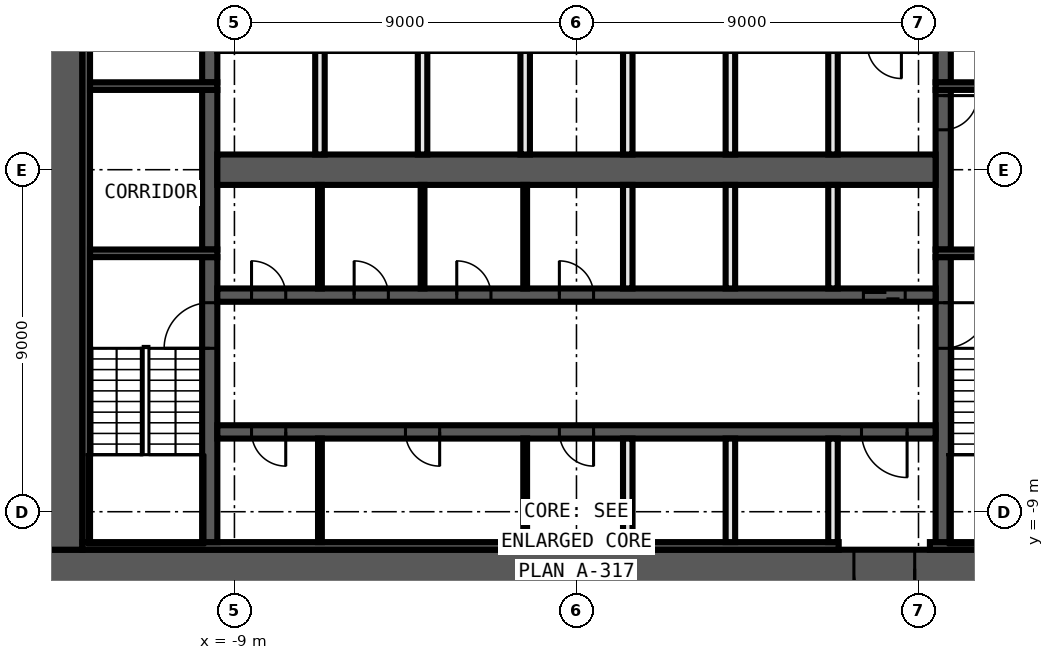
"""IFC4 building model, lengths in metres.
Left out: names, types, materials, properties, quantities, classifications, styles, units other than length and angle.
Written with IfcOpenShell. Run it as: python <this file> out.ifc"""

import sys

from ifc_helpers import new_model, si_unit, direction, frame, frame_2d, origin, place, context, subcontext, project, spatial, rectangle, extrude, element, fill, save


model = new_model("IFC4")
c1 = context("Model", 3, precision=1e-05, world=origin(), true_north=direction((0.0, 1.0)))
c2 = subcontext(c1, "Body", "Model", "MODEL_VIEW")
j1 = project(units=[si_unit("LENGTHUNIT", "METRE"), si_unit("PLANEANGLEUNIT", "RADIAN")], contexts=[c1])
p1 = place(None, origin())
s1 = spatial("IfcSite", under=j1, at=p1, CompositionType="ELEMENT")
p2 = place(p1, origin())
s2 = spatial("IfcBuilding", under=s1, at=p2, CompositionType="ELEMENT")
p3 = place(p2, frame((0.0, 0.0, 128.5)))
s3 = spatial("IfcBuildingStorey", under=s2, at=p3, CompositionType="ELEMENT", Elevation=128.5)
p4 = place(p3, frame((14.0, -10.5, 0.0), z_axis=(0.0, 0.0, 1.0), x_axis=(-1.0, 0.0, 0.0)))
e1 = element("IfcWall", 1, at=p4, inside=s3, PredefinedType="SHEAR", context=c2, shape_type="SweptSolid", body=[
    extrude(rectangle(XDim=28.0, YDim=1.0, at=frame_2d((14.0, 0.0))), origin(), (0.0, 0.0, 1.0), 3.3),
])
p5 = place(p4, frame((5.1, 0.0, 0.0)))
e2 = element("IfcOpeningElement", 2, at=p5, cuts=e1, PredefinedType="OPENING", context=c2, shape_type="SweptSolid", body=[
    extrude(rectangle(XDim=1.6, YDim=2.1, at=frame_2d((0.8, 1.05))), frame((0.0, 0.51, 0.0), z_axis=(0.0, -1.0, 0.0), x_axis=(1.0, 0.0, 0.0)), (0.0, 0.0, 1.0), 1.02),
])
p6 = place(p3, frame((-13.5, -10.0, 0.0), z_axis=(0.0, 0.0, 1.0), x_axis=(0.0, 1.0, 0.0)))
e3 = element("IfcWall", 3, at=p6, inside=s3, PredefinedType="SHEAR", context=c2, shape_type="SweptSolid", body=[
    extrude(rectangle(XDim=20.0, YDim=1.0, at=frame_2d((10.0, 0.0))), origin(), (0.0, 0.0, 1.0), 3.3),
])
p7 = place(p3, frame((13.0, -9.9, 0.0), z_axis=(0.0, 0.0, 1.0), x_axis=(-1.0, 0.0, 0.0)))
e4 = element("IfcWall", 4, at=p7, inside=s3, PredefinedType="SHEAR", context=c2, shape_type="SweptSolid", body=[
    extrude(rectangle(XDim=3.7, YDim=0.2, at=frame_2d((1.85, 0.0))), origin(), (0.0, 0.0, 1.0), 3.3),
])
p8 = place(p3, frame((6.9, -9.9, 0.0), z_axis=(0.0, 0.0, 1.0), x_axis=(-1.0, 0.0, 0.0)))
e5 = element("IfcWall", 5, at=p8, inside=s3, PredefinedType="SHEAR", context=c2, shape_type="SweptSolid", body=[
    extrude(rectangle(XDim=19.9, YDim=0.2, at=frame_2d((9.95, 0.0))), origin(), (0.0, 0.0, 1.0), 3.3),
])
p9 = place(p3, frame((-12.9, -9.8, 0.0), z_axis=(0.0, 0.0, 1.0), x_axis=(0.0, 1.0, 0.0)))
e6 = element("IfcWall", 6, at=p9, inside=s3, PredefinedType="SHEAR", context=c2, shape_type="SweptSolid", body=[
    extrude(rectangle(XDim=19.6, YDim=0.2, at=frame_2d((9.8, 0.0))), origin(), (0.0, 0.0, 1.0), 3.3),
])
p10 = place(p3, frame((9.65, -2.3, 0.0), z_axis=(0.0, 0.0, 1.0), x_axis=(0.0, -1.0, 0.0)))
e7 = element("IfcWall", 7, at=p10, inside=s3, PredefinedType="SHEAR", context=c2, shape_type="SweptSolid", body=[
    extrude(rectangle(XDim=7.5, YDim=0.4, at=frame_2d((3.75, 0.0))), origin(), (0.0, 0.0, 1.0), 3.3),
])
p11 = place(p10, frame((1.2, 0.0, 0.0)))
e8 = element("IfcOpeningElement", 8, at=p11, cuts=e7, PredefinedType="OPENING", context=c2, shape_type="SweptSolid", body=[
    extrude(rectangle(XDim=1.2, YDim=2.1, at=frame_2d((0.6, 1.05))), frame((0.0, 0.21, 0.0), z_axis=(0.0, -1.0, 0.0), x_axis=(1.0, 0.0, 0.0)), (0.0, 0.0, 1.0), 0.42),
])
p12 = place(p3, frame((9.65, 2.1, 0.0), z_axis=(0.0, 0.0, 1.0), x_axis=(0.0, -1.0, 0.0)))
e9 = element("IfcWall", 9, at=p12, inside=s3, PredefinedType="SHEAR", context=c2, shape_type="SweptSolid", body=[
    extrude(rectangle(XDim=4.2, YDim=0.4, at=frame_2d((2.1, 0.0))), origin(), (0.0, 0.0, 1.0), 3.3),
])
p13 = place(p12, frame((0.15, 0.0, 0.0)))
e10 = element("IfcOpeningElement", 10, at=p13, cuts=e9, PredefinedType="OPENING", context=c2, shape_type="SweptSolid", body=[
    extrude(rectangle(XDim=0.9, YDim=2.1, at=frame_2d((0.45, 1.05))), frame((0.0, 0.21, 0.0), z_axis=(0.0, -1.0, 0.0), x_axis=(1.0, 0.0, 0.0)), (0.0, 0.0, 1.0), 0.42),
])
p14 = place(p3, frame((9.65, 9.8, 0.0), z_axis=(0.0, 0.0, 1.0), x_axis=(0.0, -1.0, 0.0)))
e11 = element("IfcWall", 11, at=p14, inside=s3, PredefinedType="SHEAR", context=c2, shape_type="SweptSolid", body=[
    extrude(rectangle(XDim=7.5, YDim=0.4, at=frame_2d((3.75, 0.0))), origin(), (0.0, 0.0, 1.0), 3.3),
])
p15 = place(p14, frame((5.1, 0.0, 0.0)))
e12 = element("IfcOpeningElement", 12, at=p15, cuts=e11, PredefinedType="OPENING", context=c2, shape_type="SweptSolid", body=[
    extrude(rectangle(XDim=1.2, YDim=2.1, at=frame_2d((0.6, 1.05))), frame((0.0, 0.21, 0.0), z_axis=(0.0, -1.0, 0.0), x_axis=(1.0, 0.0, 0.0)), (0.0, 0.0, 1.0), 0.42),
])
p16 = place(p3, frame((-9.65, -9.8, 0.0), z_axis=(0.0, 0.0, 1.0), x_axis=(0.0, 1.0, 0.0)))
e13 = element("IfcWall", 13, at=p16, inside=s3, PredefinedType="SHEAR", context=c2, shape_type="SweptSolid", body=[
    extrude(rectangle(XDim=7.5, YDim=0.4, at=frame_2d((3.75, 0.0))), origin(), (0.0, 0.0, 1.0), 3.3),
])
p17 = place(p16, frame((5.1, 0.0, 0.0)))
e14 = element("IfcOpeningElement", 14, at=p17, cuts=e13, PredefinedType="OPENING", context=c2, shape_type="SweptSolid", body=[
    extrude(rectangle(XDim=1.2, YDim=2.1, at=frame_2d((0.6, 1.05))), frame((0.0, 0.21, 0.0), z_axis=(0.0, -1.0, 0.0), x_axis=(1.0, 0.0, 0.0)), (0.0, 0.0, 1.0), 0.42),
])
p18 = place(p3, frame((-9.65, -2.1, 0.0), z_axis=(0.0, 0.0, 1.0), x_axis=(0.0, 1.0, 0.0)))
e15 = element("IfcWall", 15, at=p18, inside=s3, PredefinedType="SHEAR", context=c2, shape_type="SweptSolid", body=[
    extrude(rectangle(XDim=4.2, YDim=0.4, at=frame_2d((2.1, 0.0))), origin(), (0.0, 0.0, 1.0), 3.3),
])
p19 = place(p3, frame((-9.65, 2.3, 0.0), z_axis=(0.0, 0.0, 1.0), x_axis=(0.0, 1.0, 0.0)))
e16 = element("IfcWall", 16, at=p19, inside=s3, PredefinedType="SHEAR", context=c2, shape_type="SweptSolid", body=[
    extrude(rectangle(XDim=7.5, YDim=0.4, at=frame_2d((3.75, 0.0))), origin(), (0.0, 0.0, 1.0), 3.3),
])
p20 = place(p19, frame((1.2, 0.0, 0.0)))
e17 = element("IfcOpeningElement", 17, at=p20, cuts=e16, PredefinedType="OPENING", context=c2, shape_type="SweptSolid", body=[
    extrude(rectangle(XDim=1.2, YDim=2.1, at=frame_2d((0.6, 1.05))), frame((0.0, 0.21, 0.0), z_axis=(0.0, -1.0, 0.0), x_axis=(1.0, 0.0, 0.0)), (0.0, 0.0, 1.0), 0.42),
])
for number, where, z_axis, x_axis in (
    (18, (9.45, 2.2, 0.0), (0.0, 0.0, 1.0), (1.0, 0.0, 0.0)),
    (19, (-9.45, 2.2, 0.0), (0.0, 0.0, 1.0), (-1.0, 0.0, 0.0)),
    (20, (9.45, -2.2, 0.0), (0.0, 0.0, 1.0), (1.0, 0.0, 0.0)),
    (21, (-9.45, -2.2, 0.0), (0.0, 0.0, 1.0), (-1.0, 0.0, 0.0)),
):
    element("IfcWall", number, at=place(p3, frame(where, z_axis=z_axis, x_axis=x_axis)), inside=s3, PredefinedType="SHEAR", context=c2, shape_type="SweptSolid", body=[
        extrude(rectangle(XDim=3.35, YDim=0.2, at=frame_2d((1.675, 0.0))), origin(), (0.0, 0.0, 1.0), 3.3),
    ])
p21 = place(p3, frame((-9.45, -3.3, 0.0), z_axis=(0.0, 0.0, 1.0), x_axis=(1.0, 0.0, 0.0)))
e22 = element("IfcWall", 22, at=p21, inside=s3, PredefinedType="SHEAR", context=c2, shape_type="SweptSolid", body=[
    extrude(rectangle(XDim=18.9, YDim=0.35, at=frame_2d((9.45, 0.0))), origin(), (0.0, 0.0, 1.0), 3.3),
])
p22 = place(p21, frame((17.0, 0.0, 0.0)))
e23 = element("IfcOpeningElement", 23, at=p22, cuts=e22, PredefinedType="OPENING", context=c2, shape_type="SweptSolid", body=[
    extrude(rectangle(XDim=1.1, YDim=2.1, at=frame_2d((0.55, 1.05))), frame((0.0, 0.185, 0.0), z_axis=(0.0, -1.0, 0.0), x_axis=(1.0, 0.0, 0.0)), (0.0, 0.0, 1.0), 0.37),
])
p23 = place(p21, frame((0.9, 0.0, 0.0)))
e24 = element("IfcOpeningElement", 24, at=p23, cuts=e22, PredefinedType="OPENING", context=c2, shape_type="SweptSolid", body=[
    extrude(rectangle(XDim=0.9, YDim=2.1, at=frame_2d((0.45, 1.05))), frame((0.0, 0.185, 0.0), z_axis=(0.0, -1.0, 0.0), x_axis=(1.0, 0.0, 0.0)), (0.0, 0.0, 1.0), 0.37),
])
p24 = place(p21, frame((3.6, 0.0, 0.0)))
e25 = element("IfcOpeningElement", 25, at=p24, cuts=e22, PredefinedType="OPENING", context=c2, shape_type="SweptSolid", body=[
    extrude(rectangle(XDim=0.9, YDim=2.1, at=frame_2d((0.45, 1.05))), frame((0.0, 0.185, 0.0), z_axis=(0.0, -1.0, 0.0), x_axis=(1.0, 0.0, 0.0)), (0.0, 0.0, 1.0), 0.37),
])
p25 = place(p21, frame((6.3, 0.0, 0.0)))
e26 = element("IfcOpeningElement", 26, at=p25, cuts=e22, PredefinedType="OPENING", context=c2, shape_type="SweptSolid", body=[
    extrude(rectangle(XDim=0.9, YDim=2.1, at=frame_2d((0.45, 1.05))), frame((0.0, 0.185, 0.0), z_axis=(0.0, -1.0, 0.0), x_axis=(1.0, 0.0, 0.0)), (0.0, 0.0, 1.0), 0.37),
])
p26 = place(p21, frame((9.0, 0.0, 0.0)))
e27 = element("IfcOpeningElement", 27, at=p26, cuts=e22, PredefinedType="OPENING", context=c2, shape_type="SweptSolid", body=[
    extrude(rectangle(XDim=0.9, YDim=2.1, at=frame_2d((0.45, 1.05))), frame((0.0, 0.185, 0.0), z_axis=(0.0, -1.0, 0.0), x_axis=(1.0, 0.0, 0.0)), (0.0, 0.0, 1.0), 0.37),
])
p27 = place(p3, frame((9.45, -6.9, 0.0), z_axis=(0.0, 0.0, 1.0), x_axis=(-1.0, 0.0, 0.0)))
e28 = element("IfcWall", 28, at=p27, inside=s3, PredefinedType="SHEAR", context=c2, shape_type="SweptSolid", body=[
    extrude(rectangle(XDim=18.9, YDim=0.35, at=frame_2d((9.45, 0.0))), origin(), (0.0, 0.0, 1.0), 3.3),
])
p28 = place(p27, frame((0.75, 0.0, 0.0)))
e29 = element("IfcOpeningElement", 29, at=p28, cuts=e28, PredefinedType="OPENING", context=c2, shape_type="SweptSolid", body=[
    extrude(rectangle(XDim=1.2, YDim=2.1, at=frame_2d((0.6, 1.05))), frame((0.0, 0.185, 0.0), z_axis=(0.0, -1.0, 0.0), x_axis=(1.0, 0.0, 0.0)), (0.0, 0.0, 1.0), 0.37),
])
p29 = place(p27, frame((17.1, 0.0, 0.0)))
e30 = element("IfcOpeningElement", 30, at=p29, cuts=e28, PredefinedType="OPENING", context=c2, shape_type="SweptSolid", body=[
    extrude(rectangle(XDim=0.9, YDim=2.1, at=frame_2d((0.45, 1.05))), frame((0.0, 0.185, 0.0), z_axis=(0.0, -1.0, 0.0), x_axis=(1.0, 0.0, 0.0)), (0.0, 0.0, 1.0), 0.37),
])
p30 = place(p27, frame((13.05, 0.0, 0.0)))
e31 = element("IfcOpeningElement", 31, at=p30, cuts=e28, PredefinedType="OPENING", context=c2, shape_type="SweptSolid", body=[
    extrude(rectangle(XDim=0.9, YDim=2.1, at=frame_2d((0.45, 1.05))), frame((0.0, 0.185, 0.0), z_axis=(0.0, -1.0, 0.0), x_axis=(1.0, 0.0, 0.0)), (0.0, 0.0, 1.0), 0.37),
])
p31 = place(p27, frame((9.0, 0.0, 0.0)))
e32 = element("IfcOpeningElement", 32, at=p31, cuts=e28, PredefinedType="OPENING", context=c2, shape_type="SweptSolid", body=[
    extrude(rectangle(XDim=0.9, YDim=2.1, at=frame_2d((0.45, 1.05))), frame((0.0, 0.185, 0.0), z_axis=(0.0, -1.0, 0.0), x_axis=(1.0, 0.0, 0.0)), (0.0, 0.0, 1.0), 0.37),
])
p32 = place(p3, frame((-9.45, 0.0, 0.0), z_axis=(0.0, 0.0, 1.0), x_axis=(1.0, 0.0, 0.0)))
e33 = element("IfcWall", 33, at=p32, inside=s3, PredefinedType="SHEAR", context=c2, shape_type="SweptSolid", body=[
    extrude(rectangle(XDim=18.9, YDim=0.8, at=frame_2d((9.45, 0.0))), origin(), (0.0, 0.0, 1.0), 3.3),
])
for number, where, z_axis, x_axis in (
    (34, (6.75, -9.8, 0.0), (0.0, 0.0, 1.0), (0.0, 1.0, 0.0)),
    (35, (6.75, -3.125, 0.0), (0.0, 0.0, 1.0), (0.0, 1.0, 0.0)),
    (36, (6.75, 0.4, 0.0), (0.0, 0.0, 1.0), (0.0, 1.0, 0.0)),
    (37, (4.05, -9.8, 0.0), (0.0, 0.0, 1.0), (0.0, 1.0, 0.0)),
    (38, (4.05, -3.125, 0.0), (0.0, 0.0, 1.0), (0.0, 1.0, 0.0)),
    (39, (4.05, 0.4, 0.0), (0.0, 0.0, 1.0), (0.0, 1.0, 0.0)),
    (40, (1.35, -9.8, 0.0), (0.0, 0.0, 1.0), (0.0, 1.0, 0.0)),
    (41, (1.35, -3.125, 0.0), (0.0, 0.0, 1.0), (0.0, 1.0, 0.0)),
    (42, (1.35, 0.4, 0.0), (0.0, 0.0, 1.0), (0.0, 1.0, 0.0)),
):
    element("IfcWall", number, at=place(p3, frame(where, z_axis=z_axis, x_axis=x_axis)), inside=s3, PredefinedType="SOLIDWALL", context=c2, shape_type="SweptSolid", body=[
        extrude(rectangle(XDim=2.725, YDim=0.25, at=frame_2d((1.363, 0.0))), origin(), (0.0, 0.0, 1.0), 3.3),
    ])
for number, where, z_axis, x_axis in (
    (43, (-1.35, -9.8, 0.0), (0.0, 0.0, 1.0), (0.0, 1.0, 0.0)),
    (44, (-1.35, -3.125, 0.0), (0.0, 0.0, 1.0), (0.0, 1.0, 0.0)),
):
    element("IfcWall", number, at=place(p3, frame(where, z_axis=z_axis, x_axis=x_axis)), inside=s3, PredefinedType="PARTITIONING", context=c2, shape_type="SweptSolid", body=[
        extrude(rectangle(XDim=2.725, YDim=0.1, at=frame_2d((1.363, 0.0))), origin(), (0.0, 0.0, 1.0), 3.3),
    ])
p33 = place(p3, frame((-1.35, 0.4, 0.0), z_axis=(0.0, 0.0, 1.0), x_axis=(0.0, 1.0, 0.0)))
e45 = element("IfcWall", 45, at=p33, inside=s3, PredefinedType="SOLIDWALL", context=c2, shape_type="SweptSolid", body=[
    extrude(rectangle(XDim=2.725, YDim=0.25, at=frame_2d((1.363, 0.0))), origin(), (0.0, 0.0, 1.0), 3.3),
])
p34 = place(p3, frame((-4.05, -3.125, 0.0), z_axis=(0.0, 0.0, 1.0), x_axis=(0.0, 1.0, 0.0)))
e46 = element("IfcWall", 46, at=p34, inside=s3, PredefinedType="PARTITIONING", context=c2, shape_type="SweptSolid", body=[
    extrude(rectangle(XDim=2.725, YDim=0.1, at=frame_2d((1.363, 0.0))), origin(), (0.0, 0.0, 1.0), 3.3),
])
p35 = place(p3, frame((-4.05, 0.4, 0.0), z_axis=(0.0, 0.0, 1.0), x_axis=(0.0, 1.0, 0.0)))
e47 = element("IfcWall", 47, at=p35, inside=s3, PredefinedType="SOLIDWALL", context=c2, shape_type="SweptSolid", body=[
    extrude(rectangle(XDim=2.725, YDim=0.25, at=frame_2d((1.363, 0.0))), origin(), (0.0, 0.0, 1.0), 3.3),
])
for number, where, z_axis, x_axis in (
    (48, (-6.75, -9.8, 0.0), (0.0, 0.0, 1.0), (0.0, 1.0, 0.0)),
    (49, (-6.75, -3.125, 0.0), (0.0, 0.0, 1.0), (0.0, 1.0, 0.0)),
):
    element("IfcWall", number, at=place(p3, frame(where, z_axis=z_axis, x_axis=x_axis)), inside=s3, PredefinedType="PARTITIONING", context=c2, shape_type="SweptSolid", body=[
        extrude(rectangle(XDim=2.725, YDim=0.1, at=frame_2d((1.363, 0.0))), origin(), (0.0, 0.0, 1.0), 3.3),
    ])
p36 = place(p3, frame((-6.75, 0.4, 0.0), z_axis=(0.0, 0.0, 1.0), x_axis=(0.0, 1.0, 0.0)))
e50 = element("IfcWall", 50, at=p36, inside=s3, PredefinedType="SOLIDWALL", context=c2, shape_type="SweptSolid", body=[
    extrude(rectangle(XDim=2.725, YDim=0.25, at=frame_2d((1.363, 0.0))), origin(), (0.0, 0.0, 1.0), 3.3),
])
p37 = place(p13, origin())
e51 = element("IfcDoor", 51, at=p37, inside=s3, OperationType="SINGLE_SWING_RIGHT", PredefinedType="DOOR", context=c2, shape_type="SweptSolid", body=[
    extrude(rectangle(XDim=0.9, YDim=2.1, at=frame_2d((0.45, 1.05))), frame((0.0, 0.025, 0.0), z_axis=(0.0, -1.0, 0.0), x_axis=(1.0, 0.0, 0.0)), (0.0, 0.0, 1.0), 0.05),
])
fill(e10, e51)
p38 = place(p22, origin())
e52 = element("IfcDoor", 52, at=p38, inside=s3, OperationType="DOUBLE_DOOR_SLIDING", PredefinedType="DOOR", context=c2, shape_type="SweptSolid", body=[
    extrude(rectangle(XDim=1.1, YDim=2.1, at=frame_2d((0.55, 1.05))), frame((0.0, 0.025, 0.0), z_axis=(0.0, -1.0, 0.0), x_axis=(1.0, 0.0, 0.0)), (0.0, 0.0, 1.0), 0.05),
])
fill(e23, e52)
p39 = place(p5, origin())
e53 = element("IfcDoor", 53, at=p39, inside=s3, OperationType="DOUBLE_DOOR_SINGLE_SWING", PredefinedType="DOOR", context=c2, shape_type="SweptSolid", body=[
    extrude(rectangle(XDim=1.6, YDim=2.1, at=frame_2d((0.8, 1.05))), frame((0.0, 0.025, 0.0), z_axis=(0.0, -1.0, 0.0), x_axis=(1.0, 0.0, 0.0)), (0.0, 0.0, 1.0), 0.05),
])
fill(e2, e53)
p40 = place(p28, origin())
e54 = element("IfcDoor", 54, at=p40, inside=s3, OperationType="SINGLE_SWING_LEFT", PredefinedType="DOOR", context=c2, shape_type="SweptSolid", body=[
    extrude(rectangle(XDim=1.2, YDim=2.1, at=frame_2d((0.6, 1.05))), frame((0.0, 0.025, 0.0), z_axis=(0.0, -1.0, 0.0), x_axis=(1.0, 0.0, 0.0)), (0.0, 0.0, 1.0), 0.05),
])
fill(e29, e54)
p41 = place(p23, origin())
e55 = element("IfcDoor", 55, at=p41, inside=s3, OperationType="SINGLE_SWING_RIGHT", PredefinedType="DOOR", context=c2, shape_type="SweptSolid", body=[
    extrude(rectangle(XDim=0.9, YDim=2.1, at=frame_2d((0.45, 1.05))), frame((0.0, 0.025, 0.0), z_axis=(0.0, -1.0, 0.0), x_axis=(1.0, 0.0, 0.0)), (0.0, 0.0, 1.0), 0.05),
])
fill(e24, e55)
p42 = place(p24, origin())
e56 = element("IfcDoor", 56, at=p42, inside=s3, OperationType="SINGLE_SWING_LEFT", PredefinedType="DOOR", context=c2, shape_type="SweptSolid", body=[
    extrude(rectangle(XDim=0.9, YDim=2.1, at=frame_2d((0.45, 1.05))), frame((0.0, 0.025, 0.0), z_axis=(0.0, -1.0, 0.0), x_axis=(1.0, 0.0, 0.0)), (0.0, 0.0, 1.0), 0.05),
])
fill(e25, e56)
p43 = place(p25, origin())
e57 = element("IfcDoor", 57, at=p43, inside=s3, OperationType="SINGLE_SWING_RIGHT", PredefinedType="DOOR", context=c2, shape_type="SweptSolid", body=[
    extrude(rectangle(XDim=0.9, YDim=2.1, at=frame_2d((0.45, 1.05))), frame((0.0, 0.025, 0.0), z_axis=(0.0, -1.0, 0.0), x_axis=(1.0, 0.0, 0.0)), (0.0, 0.0, 1.0), 0.05),
])
fill(e26, e57)
p44 = place(p26, origin())
e58 = element("IfcDoor", 58, at=p44, inside=s3, OperationType="SINGLE_SWING_LEFT", PredefinedType="DOOR", context=c2, shape_type="SweptSolid", body=[
    extrude(rectangle(XDim=0.9, YDim=2.1, at=frame_2d((0.45, 1.05))), frame((0.0, 0.025, 0.0), z_axis=(0.0, -1.0, 0.0), x_axis=(1.0, 0.0, 0.0)), (0.0, 0.0, 1.0), 0.05),
])
fill(e27, e58)
p45 = place(p29, origin())
e59 = element("IfcDoor", 59, at=p45, inside=s3, OperationType="SINGLE_SWING_RIGHT", PredefinedType="DOOR", context=c2, shape_type="SweptSolid", body=[
    extrude(rectangle(XDim=0.9, YDim=2.1, at=frame_2d((0.45, 1.05))), frame((0.0, 0.025, 0.0), z_axis=(0.0, -1.0, 0.0), x_axis=(1.0, 0.0, 0.0)), (0.0, 0.0, 1.0), 0.05),
])
fill(e30, e59)
p46 = place(p30, origin())
e60 = element("IfcDoor", 60, at=p46, inside=s3, OperationType="SINGLE_SWING_LEFT", PredefinedType="DOOR", context=c2, shape_type="SweptSolid", body=[
    extrude(rectangle(XDim=0.9, YDim=2.1, at=frame_2d((0.45, 1.05))), frame((0.0, 0.025, 0.0), z_axis=(0.0, -1.0, 0.0), x_axis=(1.0, 0.0, 0.0)), (0.0, 0.0, 1.0), 0.05),
])
fill(e31, e60)
p47 = place(p31, origin())
e61 = element("IfcDoor", 61, at=p47, inside=s3, OperationType="SINGLE_SWING_RIGHT", PredefinedType="DOOR", context=c2, shape_type="SweptSolid", body=[
    extrude(rectangle(XDim=0.9, YDim=2.1, at=frame_2d((0.45, 1.05))), frame((0.0, 0.025, 0.0), z_axis=(0.0, -1.0, 0.0), x_axis=(1.0, 0.0, 0.0)), (0.0, 0.0, 1.0), 0.05),
])
fill(e32, e61)
p48 = place(p11, origin())
e62 = element("IfcDoor", 62, at=p48, inside=s3, OperationType="SINGLE_SWING_RIGHT", PredefinedType="DOOR", context=c2, shape_type="SweptSolid", body=[
    extrude(rectangle(XDim=1.2, YDim=2.1, at=frame_2d((0.6, 1.05))), frame((0.0, 0.025, 0.0), z_axis=(0.0, -1.0, 0.0), x_axis=(1.0, 0.0, 0.0)), (0.0, 0.0, 1.0), 0.05),
])
fill(e8, e62)
p49 = place(p17, origin())
e63 = element("IfcDoor", 63, at=p49, inside=s3, OperationType="SINGLE_SWING_LEFT", PredefinedType="DOOR", context=c2, shape_type="SweptSolid", body=[
    extrude(rectangle(XDim=1.2, YDim=2.1, at=frame_2d((0.6, 1.05))), frame((0.0, 0.025, 0.0), z_axis=(0.0, -1.0, 0.0), x_axis=(1.0, 0.0, 0.0)), (0.0, 0.0, 1.0), 0.05),
])
fill(e14, e63)
save(model, sys.argv[1])
